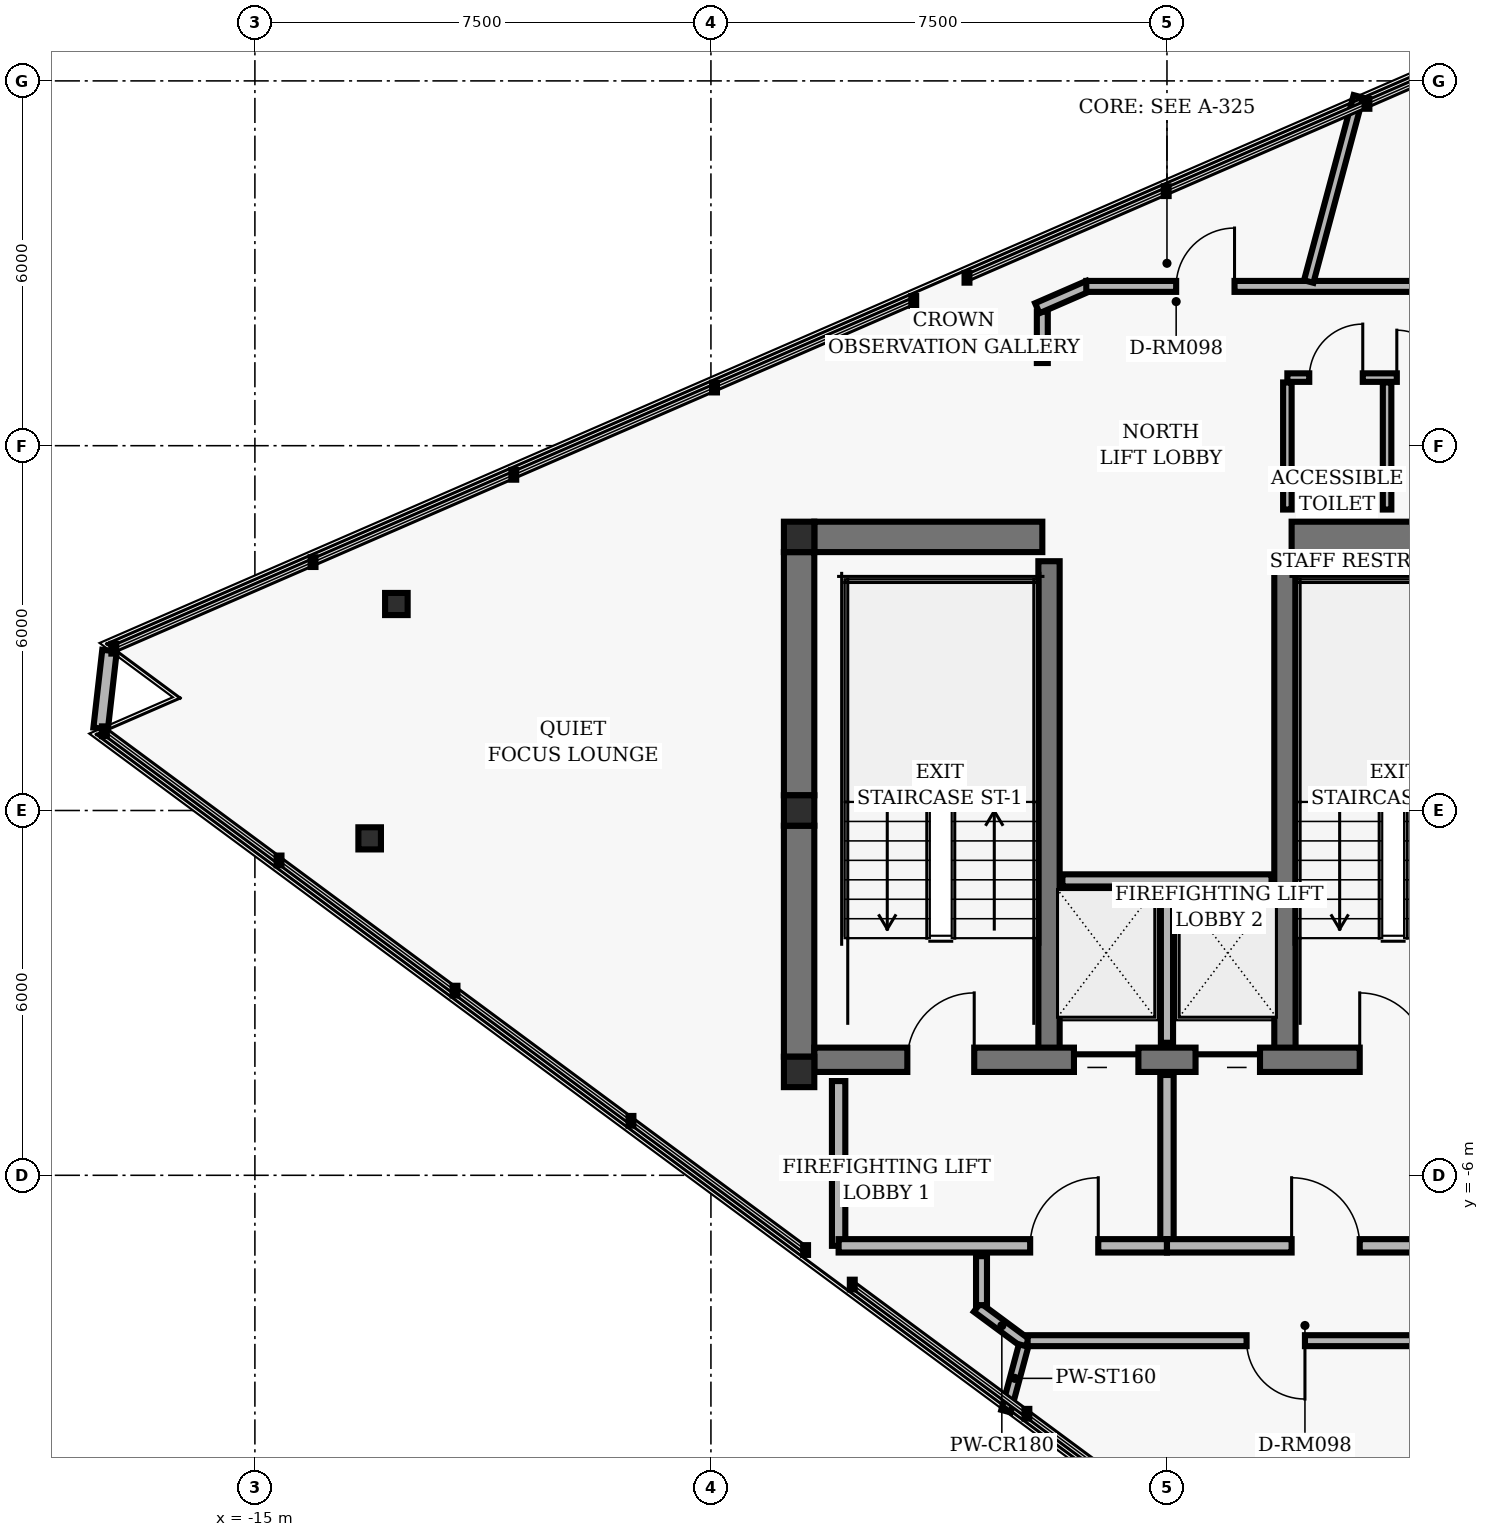
"""IFC4 building model, lengths in metres.
Left out: names, types, materials, properties, quantities, classifications, styles, units other than length and angle.
Written with IfcOpenShell. Run it as: python <this file> out.ifc"""

import sys

from ifc_helpers import new_model, si_unit, direction, frame, frame_2d, origin, origin_2d, place, context, subcontext, project, spatial, rectangle, hollow_rectangle, i_section, extrude, element, fill, save


model = new_model("IFC4")
c1 = context("Model", 3, precision=1e-05, world=origin(), true_north=direction((0.0, 1.0)))
c2 = subcontext(c1, "Body", "Model", "MODEL_VIEW")
j1 = project(units=[si_unit("LENGTHUNIT", "METRE"), si_unit("PLANEANGLEUNIT", "RADIAN")], contexts=[c1])
p1 = place(None, origin())
s1 = spatial("IfcSite", under=j1, at=p1, CompositionType="ELEMENT")
p2 = place(p1, origin())
s2 = spatial("IfcBuilding", under=s1, at=p2, CompositionType="ELEMENT")
p3 = place(p2, frame((0.0, 0.0, 246.24)))
s3 = spatial("IfcBuildingStorey", under=s2, at=p3, CompositionType="ELEMENT", Elevation=246.24)
for number, where, z_axis, x_axis in (
    (1, (-6.05, 4.5, 0.0), (0.0, 0.0, 1.0), (1.0, 0.0, 0.0)),
    (2, (-6.05, 0.0, 0.0), (0.0, 0.0, 1.0), (1.0, 0.0, 0.0)),
    (3, (-6.05, -4.3, 0.0), (0.0, 0.0, 1.0), (1.0, 0.0, 0.0)),
):
    element("IfcColumn", number, at=place(p3, frame(where, z_axis=z_axis, x_axis=x_axis)), inside=s3, PredefinedType="COLUMN", context=c2, shape_type="SweptSolid", body=[
        extrude(hollow_rectangle(XDim=0.5, YDim=0.5, WallThickness=0.02, InnerFilletRadius=0.02, OuterFilletRadius=0.04, at=origin_2d()), origin(), (0.0, 0.0, 1.0), 2.88),
    ])
p4 = place(p3, frame((-6.05, 0.25, 0.0), z_axis=(0.0, 0.0, 1.0), x_axis=(0.0, 1.0, 0.0)))
e4 = element("IfcWall", 4, at=p4, inside=s3, PredefinedType="SHEAR", context=c2, shape_type="SweptSolid", body=[
    extrude(rectangle(XDim=4.0, YDim=0.5, at=frame_2d((2.0, 0.0))), origin(), (0.0, 0.0, 1.0), 2.648),
])
p5 = place(p3, frame((-6.05, -4.05, 0.0), z_axis=(0.0, 0.0, 1.0), x_axis=(0.0, 1.0, 0.0)))
e5 = element("IfcWall", 5, at=p5, inside=s3, PredefinedType="SHEAR", context=c2, shape_type="SweptSolid", body=[
    extrude(rectangle(XDim=3.8, YDim=0.5, at=frame_2d((1.9, 0.0))), origin(), (0.0, 0.0, 1.0), 2.648),
])
for number, where, z_axis, x_axis in (
    (6, (-1.94, -4.1, 0.0), (0.0, 0.0, 1.0), (0.0, 1.0, 0.0)),
    (7, (1.94, -4.1, 0.0), (0.0, 0.0, 1.0), (0.0, 1.0, 0.0)),
):
    element("IfcWall", number, at=place(p3, frame(where, z_axis=z_axis, x_axis=x_axis)), inside=s3, PredefinedType="SHEAR", context=c2, shape_type="SweptSolid", body=[
        extrude(rectangle(XDim=8.2, YDim=0.35, at=frame_2d((4.1, 0.0))), origin(), (0.0, 0.0, 1.0), 2.648),
    ])
p6 = place(p3, frame((-5.8, -4.1, 0.0), z_axis=(0.0, 0.0, 1.0), x_axis=(1.0, 0.0, 0.0)))
e8 = element("IfcWall", 8, at=p6, inside=s3, PredefinedType="SHEAR", context=c2, shape_type="SweptSolid", body=[
    extrude(rectangle(XDim=11.6, YDim=0.4, at=frame_2d((5.8, 0.0))), origin(), (0.0, 0.0, 1.0), 2.648),
])
p7 = place(p6, frame((1.53, 0.0, 0.0)))
e9 = element("IfcOpeningElement", 9, at=p7, cuts=e8, PredefinedType="OPENING", context=c2, shape_type="SweptSolid", body=[
    extrude(rectangle(XDim=1.1, YDim=2.04, at=frame_2d((0.55, 1.02))), frame((0.0, 0.21, 0.0), z_axis=(0.0, -1.0, 0.0), x_axis=(1.0, 0.0, 0.0)), (0.0, 0.0, 1.0), 0.42),
])
p8 = place(p6, frame((8.97, 0.0, 0.0)))
e10 = element("IfcOpeningElement", 10, at=p8, cuts=e8, PredefinedType="OPENING", context=c2, shape_type="SweptSolid", body=[
    extrude(rectangle(XDim=1.1, YDim=2.04, at=frame_2d((0.55, 1.02))), frame((0.0, 0.21, 0.0), z_axis=(0.0, -1.0, 0.0), x_axis=(1.0, 0.0, 0.0)), (0.0, 0.0, 1.0), 0.42),
])
p9 = place(p6, frame((4.27, 0.0, 0.0)))
e11 = element("IfcOpeningElement", 11, at=p9, cuts=e8, PredefinedType="OPENING", context=c2, shape_type="SweptSolid", body=[
    extrude(rectangle(XDim=1.06, YDim=2.04, at=frame_2d((0.53, 1.02))), frame((0.0, 0.21, 0.0), z_axis=(0.0, -1.0, 0.0), x_axis=(1.0, 0.0, 0.0)), (0.0, 0.0, 1.0), 0.42),
])
p10 = place(p6, frame((6.27, 0.0, 0.0)))
e12 = element("IfcOpeningElement", 12, at=p10, cuts=e8, PredefinedType="OPENING", context=c2, shape_type="SweptSolid", body=[
    extrude(rectangle(XDim=1.06, YDim=2.04, at=frame_2d((0.53, 1.02))), frame((0.0, 0.21, 0.0), z_axis=(0.0, -1.0, 0.0), x_axis=(1.0, 0.0, 0.0)), (0.0, 0.0, 1.0), 0.42),
])
for number, where, z_axis, x_axis in (
    (13, (-5.8, 4.5, 0.0), (0.0, 0.0, 1.0), (1.0, 0.0, 0.0)),
    (14, (2.05, 4.5, 0.0), (0.0, 0.0, 1.0), (1.0, 0.0, 0.0)),
):
    element("IfcWall", number, at=place(p3, frame(where, z_axis=z_axis, x_axis=x_axis)), inside=s3, PredefinedType="SHEAR", context=c2, shape_type="SweptSolid", body=[
        extrude(rectangle(XDim=3.75, YDim=0.5, at=frame_2d((1.875, 0.0))), origin(), (0.0, 0.0, 1.0), 2.648),
    ])
for number, where, z_axis, x_axis in (
    (15, (-12.673, 3.396, 0.0), (0.0, 0.0, 1.0), (1.0, 0.0, 0.0)),
    (16, (-13.113, -0.458, 0.0), (0.0, 0.0, 1.0), (1.0, 0.0, 0.0)),
):
    element("IfcColumn", number, at=place(p3, frame(where, z_axis=z_axis, x_axis=x_axis)), inside=s3, PredefinedType="COLUMN", context=c2, shape_type="SweptSolid", body=[
        extrude(i_section(OverallWidth=0.371, OverallDepth=0.364, WebThickness=0.013, FlangeThickness=0.022, FilletRadius=0.015, at=origin_2d()), origin(), (0.0, 0.0, 1.0), 2.88),
    ])
p11 = place(p3, frame((-17.391, 2.63, 0.0), z_axis=(0.0, 0.0, 1.0), x_axis=(-0.113156349647, -0.993577194049, 0.0)))
e17 = element("IfcWall", 17, at=p11, inside=s3, PredefinedType="PARAPET", context=c2, shape_type="SweptSolid", body=[
    extrude(rectangle(XDim=1.288, YDim=0.24, at=frame_2d((0.644, 0.0))), origin(), (0.0, 0.0, 1.0), 2.168),
])
p12 = place(p3, frame((0.0, -3.82, 0.0), z_axis=(0.0, 0.0, 1.0), x_axis=(0.0, 1.0, 0.0)))
e18 = element("IfcWall", 18, at=p12, inside=s3, PredefinedType="PARTITIONING", context=c2, shape_type="SweptSolid", body=[
    extrude(rectangle(XDim=2.67, YDim=0.2, at=frame_2d((1.335, 0.0))), origin(), (0.0, 0.0, 1.0), 2.623),
])
p13 = place(p3, frame((-1.72, -1.15, 0.0), z_axis=(0.0, 0.0, 1.0), x_axis=(1.0, 0.0, 0.0)))
e19 = element("IfcWall", 19, at=p13, inside=s3, PredefinedType="PARTITIONING", context=c2, shape_type="SweptSolid", body=[
    extrude(rectangle(XDim=3.44, YDim=0.2, at=frame_2d((1.72, 0.0))), origin(), (0.0, 0.0, 1.0), 2.623),
])
p14 = place(p3, frame((-5.4, -7.16, 0.0), z_axis=(0.0, 0.0, 1.0), x_axis=(0.0, 1.0, 0.0)))
e20 = element("IfcWall", 20, at=p14, inside=s3, PredefinedType="PARTITIONING", context=c2, shape_type="SweptSolid", body=[
    extrude(rectangle(XDim=2.71, YDim=0.22, at=frame_2d((1.355, 0.0))), origin(), (0.0, 0.0, 1.0), 2.623),
])
p15 = place(p3, frame((0.0, -7.16, 0.0), z_axis=(0.0, 0.0, 1.0), x_axis=(0.0, 1.0, 0.0)))
e21 = element("IfcWall", 21, at=p15, inside=s3, PredefinedType="PARTITIONING", context=c2, shape_type="SweptSolid", body=[
    extrude(rectangle(XDim=2.81, YDim=0.22, at=frame_2d((1.405, 0.0))), origin(), (0.0, 0.0, 1.0), 2.623),
])
p16 = place(p3, frame((-5.4, -7.16, 0.0), z_axis=(0.0, 0.0, 1.0), x_axis=(1.0, 0.0, 0.0)))
e22 = element("IfcWall", 22, at=p16, inside=s3, PredefinedType="PARTITIONING", context=c2, shape_type="SweptSolid", body=[
    extrude(rectangle(XDim=5.4, YDim=0.22, at=frame_2d((2.7, 0.0))), origin(), (0.0, 0.0, 1.0), 2.623),
])
p17 = place(p16, frame((3.15, 0.0, 0.0)))
e23 = element("IfcOpeningElement", 23, at=p17, cuts=e22, PredefinedType="OPENING", context=c2, shape_type="SweptSolid", body=[
    extrude(rectangle(XDim=1.12, YDim=2.02, at=frame_2d((0.56, 1.01))), frame((0.0, 0.12, 0.0), z_axis=(0.0, -1.0, 0.0), x_axis=(1.0, 0.0, 0.0)), (0.0, 0.0, 1.0), 0.24),
])
p18 = place(p3, frame((0.0, -7.16, 0.0), z_axis=(0.0, 0.0, 1.0), x_axis=(1.0, 0.0, 0.0)))
e24 = element("IfcWall", 24, at=p18, inside=s3, PredefinedType="PARTITIONING", context=c2, shape_type="SweptSolid", body=[
    extrude(rectangle(XDim=4.95, YDim=0.22, at=frame_2d((2.475, 0.0))), origin(), (0.0, 0.0, 1.0), 2.623),
])
p19 = place(p18, frame((2.05, 0.0, 0.0)))
e25 = element("IfcOpeningElement", 25, at=p19, cuts=e24, PredefinedType="OPENING", context=c2, shape_type="SweptSolid", body=[
    extrude(rectangle(XDim=1.12, YDim=2.02, at=frame_2d((0.56, 1.01))), frame((0.0, 0.12, 0.0), z_axis=(0.0, -1.0, 0.0), x_axis=(1.0, 0.0, 0.0)), (0.0, 0.0, 1.0), 0.24),
])
p20 = place(p3, frame((1.98, 4.95, 0.0), z_axis=(0.0, 0.0, 1.0), x_axis=(0.0, 1.0, 0.0)))
e26 = element("IfcWall", 26, at=p20, inside=s3, PredefinedType="PARTITIONING", context=c2, shape_type="SweptSolid", body=[
    extrude(rectangle(XDim=2.09, YDim=0.14, at=frame_2d((1.045, 0.0))), origin(), (0.0, 0.0, 1.0), 2.623),
])
p21 = place(p3, frame((1.98, 7.12, 0.0), z_axis=(0.0, 0.0, 1.0), x_axis=(1.0, 0.0, 0.0)))
e27 = element("IfcWall", 27, at=p21, inside=s3, PredefinedType="PARTITIONING", context=c2, shape_type="SweptSolid", body=[
    extrude(rectangle(XDim=3.86, YDim=0.14, at=frame_2d((1.93, 0.0))), origin(), (0.0, 0.0, 1.0), 2.623),
])
p22 = place(p21, frame((0.36, 0.0, 0.0)))
e28 = element("IfcOpeningElement", 28, at=p22, cuts=e27, PredefinedType="OPENING", context=c2, shape_type="SweptSolid", body=[
    extrude(rectangle(XDim=0.88, YDim=2.02, at=frame_2d((0.44, 1.01))), frame((0.0, 0.08, 0.0), z_axis=(0.0, -1.0, 0.0), x_axis=(1.0, 0.0, 0.0)), (0.0, 0.0, 1.0), 0.16),
])
p23 = place(p21, frame((1.8, 0.0, 0.0)))
e29 = element("IfcOpeningElement", 29, at=p23, cuts=e27, PredefinedType="OPENING", context=c2, shape_type="SweptSolid", body=[
    extrude(rectangle(XDim=0.78, YDim=2.01, at=frame_2d((0.39, 1.005))), frame((0.0, 0.08, 0.0), z_axis=(0.0, -1.0, 0.0), x_axis=(1.0, 0.0, 0.0)), (0.0, 0.0, 1.0), 0.16),
])
p24 = place(p21, frame((2.92, 0.0, 0.0)))
e30 = element("IfcOpeningElement", 30, at=p24, cuts=e27, PredefinedType="OPENING", context=c2, shape_type="SweptSolid", body=[
    extrude(rectangle(XDim=0.78, YDim=2.01, at=frame_2d((0.39, 1.005))), frame((0.0, 0.08, 0.0), z_axis=(0.0, -1.0, 0.0), x_axis=(1.0, 0.0, 0.0)), (0.0, 0.0, 1.0), 0.16),
])
p25 = place(p3, frame((3.62, 4.95, 0.0), z_axis=(0.0, 0.0, 1.0), x_axis=(0.0, 1.0, 0.0)))
e31 = element("IfcWall", 31, at=p25, inside=s3, PredefinedType="PARTITIONING", context=c2, shape_type="SweptSolid", body=[
    extrude(rectangle(XDim=2.09, YDim=0.14, at=frame_2d((1.045, 0.0))), origin(), (0.0, 0.0, 1.0), 2.623),
])
p26 = place(p3, frame((-2.309, -8.773, 0.0), z_axis=(0.0, 0.0, 1.0), x_axis=(-0.803864984235, 0.594811808155, 0.0)))
e32 = element("IfcWall", 32, at=p26, inside=s3, PredefinedType="PARTITIONING", context=c2, shape_type="SweptSolid", body=[
    extrude(rectangle(XDim=1.011, YDim=0.18, at=frame_2d((0.506, 0.0))), origin(), (0.0, 0.0, 1.0), 2.203),
])
p27 = place(p3, frame((-3.05, -8.135, 0.0), z_axis=(0.0, 0.0, 1.0), x_axis=(0.0, 1.0, 0.0)))
e33 = element("IfcWall", 33, at=p27, inside=s3, PredefinedType="PARTITIONING", context=c2, shape_type="SweptSolid", body=[
    extrude(rectangle(XDim=0.805, YDim=0.18, at=frame_2d((0.403, 0.0))), origin(), (0.0, 0.0, 1.0), 2.623),
])
p28 = place(p3, frame((-2.05, 7.36, 0.0), z_axis=(0.0, 0.0, 1.0), x_axis=(0.0, 1.0, 0.0)))
e34 = element("IfcWall", 34, at=p28, inside=s3, PredefinedType="PARTITIONING", context=c2, shape_type="SweptSolid", body=[
    extrude(rectangle(XDim=0.847, YDim=0.18, at=frame_2d((0.423, 0.0))), origin(), (0.0, 0.0, 1.0), 2.623),
])
p29 = place(p3, frame((-2.133, 8.261, 0.0), z_axis=(0.0, 0.0, 1.0), x_axis=(0.917032085412, 0.398813432979, 0.0)))
e35 = element("IfcWall", 35, at=p29, inside=s3, PredefinedType="PARTITIONING", context=c2, shape_type="SweptSolid", body=[
    extrude(rectangle(XDim=0.92, YDim=0.18, at=frame_2d((0.46, 0.0))), origin(), (0.0, 0.0, 1.0), 2.203),
])
p30 = place(p3, frame((-1.327, 8.62, 0.0), z_axis=(0.0, 0.0, 1.0), x_axis=(1.0, 0.0, 0.0)))
e36 = element("IfcWall", 36, at=p30, inside=s3, PredefinedType="PARTITIONING", context=c2, shape_type="SweptSolid", body=[
    extrude(rectangle(XDim=7.197, YDim=0.18, at=frame_2d((3.599, 0.0))), origin(), (0.0, 0.0, 1.0), 2.623),
])
p31 = place(p30, frame((1.478, 0.0, 0.0)))
e37 = element("IfcOpeningElement", 37, at=p31, cuts=e36, PredefinedType="OPENING", context=c2, shape_type="SweptSolid", body=[
    extrude(rectangle(XDim=0.96, YDim=2.02, at=frame_2d((0.48, 1.01))), frame((0.0, 0.1, 0.0), z_axis=(0.0, -1.0, 0.0), x_axis=(1.0, 0.0, 0.0)), (0.0, 0.0, 1.0), 0.2),
])
p32 = place(p3, frame((5.87, -8.72, 0.0), z_axis=(0.0, 0.0, 1.0), x_axis=(-1.0, 0.0, 0.0)))
e38 = element("IfcWall", 38, at=p32, inside=s3, PredefinedType="PARTITIONING", context=c2, shape_type="SweptSolid", body=[
    extrude(rectangle(XDim=8.162, YDim=0.18, at=frame_2d((4.081, 0.0))), origin(), (0.0, 0.0, 1.0), 2.623),
])
p33 = place(p32, frame((3.601, 0.0, 0.0)))
e39 = element("IfcOpeningElement", 39, at=p33, cuts=e38, PredefinedType="OPENING", context=c2, shape_type="SweptSolid", body=[
    extrude(rectangle(XDim=0.96, YDim=2.02, at=frame_2d((0.48, 1.01))), frame((0.0, 0.1, 0.0), z_axis=(0.0, -1.0, 0.0), x_axis=(1.0, 0.0, 0.0)), (0.0, 0.0, 1.0), 0.2),
])
p34 = place(p3, frame((-2.358, -8.8, 0.0), z_axis=(0.0, 0.0, 1.0), x_axis=(-0.258899893442, -0.965904159415, 0.0)))
e40 = element("IfcWall", 40, at=p34, inside=s3, PredefinedType="PARTITIONING", context=c2, shape_type="SweptSolid", body=[
    extrude(rectangle(XDim=1.117, YDim=0.16, at=frame_2d((0.559, 0.0))), origin(), (0.0, 0.0, 1.0), 2.623),
])
p35 = place(p3, frame((2.331, 8.7, 0.0), z_axis=(0.0, 0.0, 1.0), x_axis=(0.258790273714, 0.9659335351, 0.0)))
e41 = element("IfcWall", 41, at=p35, inside=s3, PredefinedType="PARTITIONING", context=c2, shape_type="SweptSolid", body=[
    extrude(rectangle(XDim=3.153, YDim=0.16, at=frame_2d((1.576, 0.0))), origin(), (0.0, 0.0, 1.0), 2.623),
])
p36 = place(p7, origin())
e42 = element("IfcDoor", 42, at=p36, inside=s3, OperationType="SINGLE_SWING_RIGHT", PredefinedType="DOOR", context=c2, shape_type="SweptSolid", body=[
    extrude(rectangle(XDim=1.1, YDim=2.04, at=frame_2d((0.55, 1.02))), frame((0.0, 0.025, 0.0), z_axis=(0.0, -1.0, 0.0), x_axis=(1.0, 0.0, 0.0)), (0.0, 0.0, 1.0), 0.05),
])
fill(e9, e42)
p37 = place(p8, origin())
e43 = element("IfcDoor", 43, at=p37, inside=s3, OperationType="SINGLE_SWING_LEFT", PredefinedType="DOOR", context=c2, shape_type="SweptSolid", body=[
    extrude(rectangle(XDim=1.1, YDim=2.04, at=frame_2d((0.55, 1.02))), frame((0.0, 0.025, 0.0), z_axis=(0.0, -1.0, 0.0), x_axis=(1.0, 0.0, 0.0)), (0.0, 0.0, 1.0), 0.05),
])
fill(e10, e43)
p38 = place(p9, origin())
e44 = element("IfcDoor", 44, at=p38, inside=s3, OperationType="SLIDING_TO_LEFT", PredefinedType="DOOR", context=c2, shape_type="SweptSolid", body=[
    extrude(rectangle(XDim=1.06, YDim=2.04, at=frame_2d((0.53, 1.02))), frame((0.0, 0.025, 0.0), z_axis=(0.0, -1.0, 0.0), x_axis=(1.0, 0.0, 0.0)), (0.0, 0.0, 1.0), 0.05),
])
fill(e11, e44)
p39 = place(p10, origin())
e45 = element("IfcDoor", 45, at=p39, inside=s3, OperationType="SLIDING_TO_RIGHT", PredefinedType="DOOR", context=c2, shape_type="SweptSolid", body=[
    extrude(rectangle(XDim=1.06, YDim=2.04, at=frame_2d((0.53, 1.02))), frame((0.0, 0.025, 0.0), z_axis=(0.0, -1.0, 0.0), x_axis=(1.0, 0.0, 0.0)), (0.0, 0.0, 1.0), 0.05),
])
fill(e12, e45)
p40 = place(p17, origin())
e46 = element("IfcDoor", 46, at=p40, inside=s3, OperationType="SINGLE_SWING_RIGHT", PredefinedType="DOOR", context=c2, shape_type="SweptSolid", body=[
    extrude(rectangle(XDim=1.12, YDim=2.02, at=frame_2d((0.56, 1.01))), frame((0.0, 0.025, 0.0), z_axis=(0.0, -1.0, 0.0), x_axis=(1.0, 0.0, 0.0)), (0.0, 0.0, 1.0), 0.05),
])
fill(e23, e46)
p41 = place(p19, origin())
e47 = element("IfcDoor", 47, at=p41, inside=s3, OperationType="SINGLE_SWING_LEFT", PredefinedType="DOOR", context=c2, shape_type="SweptSolid", body=[
    extrude(rectangle(XDim=1.12, YDim=2.02, at=frame_2d((0.56, 1.01))), frame((0.0, 0.025, 0.0), z_axis=(0.0, -1.0, 0.0), x_axis=(1.0, 0.0, 0.0)), (0.0, 0.0, 1.0), 0.05),
])
fill(e25, e47)
p42 = place(p22, origin())
e48 = element("IfcDoor", 48, at=p42, inside=s3, OperationType="SINGLE_SWING_RIGHT", PredefinedType="DOOR", context=c2, shape_type="SweptSolid", body=[
    extrude(rectangle(XDim=0.88, YDim=2.02, at=frame_2d((0.44, 1.01))), frame((0.0, 0.025, 0.0), z_axis=(0.0, -1.0, 0.0), x_axis=(1.0, 0.0, 0.0)), (0.0, 0.0, 1.0), 0.05),
])
fill(e28, e48)
p43 = place(p23, origin())
e49 = element("IfcDoor", 49, at=p43, inside=s3, OperationType="SINGLE_SWING_LEFT", PredefinedType="DOOR", context=c2, shape_type="SweptSolid", body=[
    extrude(rectangle(XDim=0.78, YDim=2.01, at=frame_2d((0.39, 1.005))), frame((0.0, 0.025, 0.0), z_axis=(0.0, -1.0, 0.0), x_axis=(1.0, 0.0, 0.0)), (0.0, 0.0, 1.0), 0.05),
])
fill(e29, e49)
p44 = place(p33, origin())
e50 = element("IfcDoor", 50, at=p44, inside=s3, OperationType="SINGLE_SWING_LEFT", PredefinedType="DOOR", context=c2, shape_type="SweptSolid", body=[
    extrude(rectangle(XDim=0.96, YDim=2.02, at=frame_2d((0.48, 1.01))), frame((0.0, 0.025, 0.0), z_axis=(0.0, -1.0, 0.0), x_axis=(1.0, 0.0, 0.0)), (0.0, 0.0, 1.0), 0.05),
])
fill(e39, e50)
p45 = place(p31, origin())
e51 = element("IfcDoor", 51, at=p45, inside=s3, OperationType="SINGLE_SWING_RIGHT", PredefinedType="DOOR", context=c2, shape_type="SweptSolid", body=[
    extrude(rectangle(XDim=0.96, YDim=2.02, at=frame_2d((0.48, 1.01))), frame((0.0, 0.025, 0.0), z_axis=(0.0, -1.0, 0.0), x_axis=(1.0, 0.0, 0.0)), (0.0, 0.0, 1.0), 0.05),
])
fill(e37, e51)
save(model, sys.argv[1])
